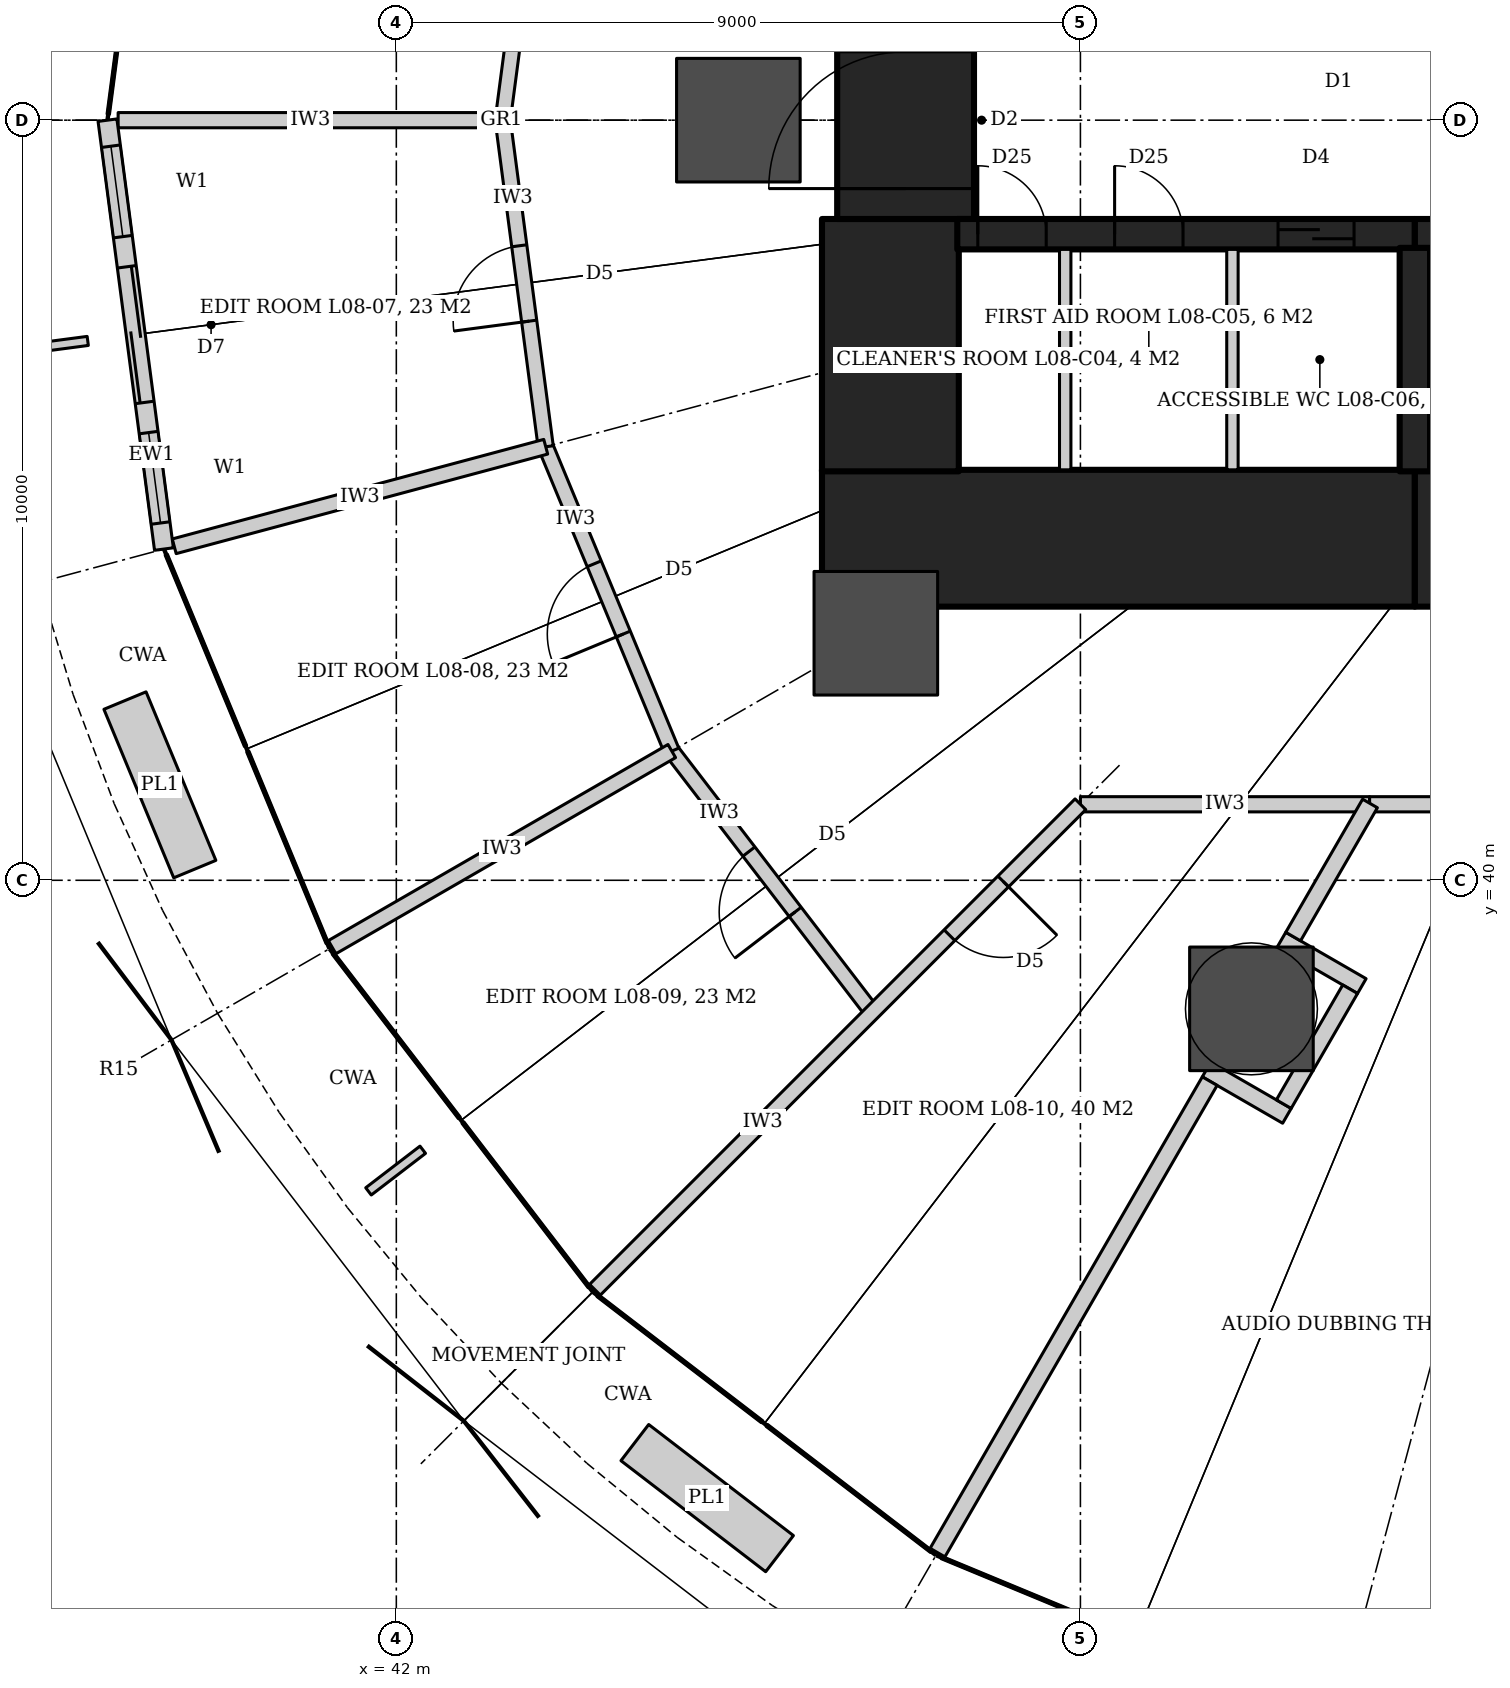
"""IFC4 building model, lengths in metres.
Left out: names, types, materials, properties, quantities, classifications, styles, units other than length and angle.
Written with IfcOpenShell. Run it as: python <this file> out.ifc"""

import sys

from ifc_helpers import new_model, si_unit, direction, frame, frame_2d, origin, origin_2d, place, context, subcontext, project, spatial, rectangle, hollow_circle, extrude, element, fill, save


model = new_model("IFC4")
c1 = context("Model", 3, precision=1e-05, world=origin(), true_north=direction((0.0, 1.0)))
c2 = subcontext(c1, "Body", "Model", "MODEL_VIEW")
j1 = project(units=[si_unit("LENGTHUNIT", "METRE"), si_unit("PLANEANGLEUNIT", "RADIAN")], contexts=[c1])
p1 = place(None, origin())
s1 = spatial("IfcSite", under=j1, at=p1, CompositionType="ELEMENT")
p2 = place(p1, origin())
s2 = spatial("IfcBuilding", under=s1, at=p2, CompositionType="ELEMENT")
p3 = place(p2, frame((0.0, 0.0, 42.8)))
s3 = spatial("IfcBuildingStorey", under=s2, at=p3, CompositionType="ELEMENT", Elevation=42.8)
p4 = place(p3, frame((47.6, 44.5, 0.0), z_axis=(0.0, 0.0, 1.0), x_axis=(1.0, 0.0, 0.0)))
e1 = element("IfcWall", 1, at=p4, inside=s3, PredefinedType="SHEAR", context=c2, shape_type="SweptSolid", body=[
    extrude(rectangle(XDim=7.8, YDim=1.8, at=frame_2d((3.9, 0.0))), origin(), (0.0, 0.0, 1.0), 4.2),
])
p5 = place(p3, frame((55.4, 44.5, 0.0), z_axis=(0.0, 0.0, 1.0), x_axis=(1.0, 0.0, 0.0)))
e2 = element("IfcWall", 2, at=p5, inside=s3, PredefinedType="SHEAR", context=c2, shape_type="SweptSolid", body=[
    extrude(rectangle(XDim=9.2, YDim=1.8, at=frame_2d((4.6, 0.0))), origin(), (0.0, 0.0, 1.0), 4.2),
])
p6 = place(p3, frame((48.5, 45.38, 0.0), z_axis=(0.0, 0.0, 1.0), x_axis=(0.0, 1.0, 0.0)))
e3 = element("IfcWall", 3, at=p6, inside=s3, PredefinedType="SHEAR", context=c2, shape_type="SweptSolid", body=[
    extrude(rectangle(XDim=3.32, YDim=1.8, at=frame_2d((1.66, 0.0))), origin(), (0.0, 0.0, 1.0), 4.2),
])
p7 = place(p3, frame((48.7, 48.7, 0.0), z_axis=(0.0, 0.0, 1.0), x_axis=(0.0, 1.0, 0.0)))
e4 = element("IfcWall", 4, at=p7, inside=s3, PredefinedType="SHEAR", context=c2, shape_type="SweptSolid", body=[
    extrude(rectangle(XDim=2.6, YDim=1.8, at=frame_2d((1.3, 0.0))), origin(), (0.0, 0.0, 1.0), 4.2),
])
p8 = place(p7, frame((0.4, 0.0, 0.0)))
e5 = element("IfcOpeningElement", 5, at=p8, cuts=e4, PredefinedType="OPENING", context=c2, shape_type="SweptSolid", body=[
    extrude(rectangle(XDim=1.8, YDim=2.1, at=frame_2d((0.9, 1.05))), frame((0.0, 0.91, 0.0), z_axis=(0.0, -1.0, 0.0), x_axis=(1.0, 0.0, 0.0)), (0.0, 0.0, 1.0), 1.82),
])
p9 = place(p3, frame((49.38, 48.5, 0.0), z_axis=(0.0, 0.0, 1.0), x_axis=(1.0, 0.0, 0.0)))
e6 = element("IfcWall", 6, at=p9, inside=s3, PredefinedType="SHEAR", context=c2, shape_type="SweptSolid", body=[
    extrude(rectangle(XDim=6.02, YDim=0.4, at=frame_2d((3.01, 0.0))), origin(), (0.0, 0.0, 1.0), 4.2),
])
p10 = place(p9, frame((0.27, 0.0, 0.0)))
e7 = element("IfcOpeningElement", 7, at=p10, cuts=e6, PredefinedType="OPENING", context=c2, shape_type="SweptSolid", body=[
    extrude(rectangle(XDim=0.9, YDim=2.1, at=frame_2d((0.45, 1.05))), frame((0.0, 0.21, 0.0), z_axis=(0.0, -1.0, 0.0), x_axis=(1.0, 0.0, 0.0)), (0.0, 0.0, 1.0), 0.42),
])
p11 = place(p9, frame((2.07, 0.0, 0.0)))
e8 = element("IfcOpeningElement", 8, at=p11, cuts=e6, PredefinedType="OPENING", context=c2, shape_type="SweptSolid", body=[
    extrude(rectangle(XDim=0.9, YDim=2.1, at=frame_2d((0.45, 1.05))), frame((0.0, 0.21, 0.0), z_axis=(0.0, -1.0, 0.0), x_axis=(1.0, 0.0, 0.0)), (0.0, 0.0, 1.0), 0.42),
])
p12 = place(p9, frame((4.22, 0.0, 0.0)))
e9 = element("IfcOpeningElement", 9, at=p12, cuts=e6, PredefinedType="OPENING", context=c2, shape_type="SweptSolid", body=[
    extrude(rectangle(XDim=1.0, YDim=2.1, at=frame_2d((0.5, 1.05))), frame((0.0, 0.21, 0.0), z_axis=(0.0, -1.0, 0.0), x_axis=(1.0, 0.0, 0.0)), (0.0, 0.0, 1.0), 0.42),
])
p13 = place(p3, frame((55.4, 48.5, 0.0), z_axis=(0.0, 0.0, 1.0), x_axis=(1.0, 0.0, 0.0)))
e10 = element("IfcWall", 10, at=p13, inside=s3, PredefinedType="SHEAR", context=c2, shape_type="SweptSolid", body=[
    extrude(rectangle(XDim=9.2, YDim=0.4, at=frame_2d((4.6, 0.0))), origin(), (0.0, 0.0, 1.0), 4.2),
])
p14 = place(p3, frame((55.4, 48.32, 0.0), z_axis=(0.0, 0.0, 1.0), x_axis=(0.0, -1.0, 0.0)))
e11 = element("IfcWall", 11, at=p14, inside=s3, PredefinedType="SHEAR", context=c2, shape_type="SweptSolid", body=[
    extrude(rectangle(XDim=2.94, YDim=0.4, at=frame_2d((1.47, 0.0))), origin(), (0.0, 0.0, 1.0), 4.2),
])
for number, where, z_axis, x_axis in (
    (12, (46.5, 50.0, 0.0), (0.0, 0.0, 1.0), (1.0, 0.0, 0.0)),
    (13, (48.309, 43.25, 0.0), (0.0, 0.0, 1.0), (1.0, 0.0, 0.0)),
    (14, (53.25, 38.309, 0.0), (0.0, 0.0, 1.0), (1.0, 0.0, 0.0)),
):
    element("IfcColumn", number, at=place(p3, frame(where, z_axis=z_axis, x_axis=x_axis)), inside=s3, PredefinedType="COLUMN", context=c2, shape_type="SweptSolid", body=[
        extrude(hollow_circle(Radius=0.813, WallThickness=0.08, at=origin_2d()), origin(), (0.0, 0.0, 1.0), 4.2),
    ])
p15 = place(p3, frame((48.262, 38.262, 0.0), z_axis=(0.0, 0.0, 1.0), x_axis=(-0.60874374674, 0.79336690806, 0.0)))
e15 = element("IfcWall", 15, at=p15, inside=s3, PredefinedType="PARTITIONING", context=c2, shape_type="SweptSolid", body=[
    extrude(rectangle(XDim=4.333, YDim=0.2, at=frame_2d((2.167, 0.0))), origin(), (0.0, 0.0, 1.0), 3.04),
])
p16 = place(p15, frame((1.667, 0.0, 0.0)))
e16 = element("IfcOpeningElement", 16, at=p16, cuts=e15, PredefinedType="OPENING", context=c2, shape_type="SweptSolid", body=[
    extrude(rectangle(XDim=1.0, YDim=2.1, at=frame_2d((0.5, 1.05))), frame((0.0, 0.11, 0.0), z_axis=(0.0, -1.0, 0.0), x_axis=(1.0, 0.0, 0.0)), (0.0, 0.0, 1.0), 0.22),
])
p17 = place(p3, frame((45.624, 41.7, 0.0), z_axis=(0.0, 0.0, 1.0), x_axis=(-0.382698425325, 0.923873322082, 0.0)))
e17 = element("IfcWall", 17, at=p17, inside=s3, PredefinedType="PARTITIONING", context=c2, shape_type="SweptSolid", body=[
    extrude(rectangle(XDim=4.333, YDim=0.2, at=frame_2d((2.167, 0.0))), origin(), (0.0, 0.0, 1.0), 3.04),
])
p18 = place(p17, frame((1.667, 0.0, 0.0)))
e18 = element("IfcOpeningElement", 18, at=p18, cuts=e17, PredefinedType="OPENING", context=c2, shape_type="SweptSolid", body=[
    extrude(rectangle(XDim=1.0, YDim=2.1, at=frame_2d((0.5, 1.05))), frame((0.0, 0.11, 0.0), z_axis=(0.0, -1.0, 0.0), x_axis=(1.0, 0.0, 0.0)), (0.0, 0.0, 1.0), 0.22),
])
p19 = place(p3, frame((43.966, 45.704, 0.0), z_axis=(0.0, 0.0, 1.0), x_axis=(-0.130536124221, 0.99144355375, 0.0)))
e19 = element("IfcWall", 19, at=p19, inside=s3, PredefinedType="PARTITIONING", context=c2, shape_type="SweptSolid", body=[
    extrude(rectangle(XDim=4.333, YDim=0.2, at=frame_2d((2.167, 0.0))), origin(), (0.0, 0.0, 1.0), 3.04),
])
p20 = place(p19, frame((1.667, 0.0, 0.0)))
e20 = element("IfcOpeningElement", 20, at=p20, cuts=e19, PredefinedType="OPENING", context=c2, shape_type="SweptSolid", body=[
    extrude(rectangle(XDim=1.0, YDim=2.1, at=frame_2d((0.5, 1.05))), frame((0.0, 0.11, 0.0), z_axis=(0.0, -1.0, 0.0), x_axis=(1.0, 0.0, 0.0)), (0.0, 0.0, 1.0), 0.22),
])
p21 = place(p3, frame((43.4, 50.0, 0.0), z_axis=(0.0, 0.0, 1.0), x_axis=(0.130536124221, 0.99144355375, 0.0)))
e21 = element("IfcWall", 21, at=p21, inside=s3, PredefinedType="PARTITIONING", context=c2, shape_type="SweptSolid", body=[
    extrude(rectangle(XDim=4.333, YDim=0.2, at=frame_2d((2.167, 0.0))), origin(), (0.0, 0.0, 1.0), 3.04),
])
p22 = place(p21, frame((1.667, 0.0, 0.0)))
e22 = element("IfcOpeningElement", 22, at=p22, cuts=e21, PredefinedType="OPENING", context=c2, shape_type="SweptSolid", body=[
    extrude(rectangle(XDim=1.0, YDim=2.1, at=frame_2d((0.5, 1.05))), frame((0.0, 0.11, 0.0), z_axis=(0.0, -1.0, 0.0), x_axis=(1.0, 0.0, 0.0)), (0.0, 0.0, 1.0), 0.22),
])
p23 = place(p3, frame((60.0, 41.0, 0.0), z_axis=(0.0, 0.0, 1.0), x_axis=(-1.0, 0.0, 0.0)))
e23 = element("IfcWall", 23, at=p23, inside=s3, PredefinedType="PARTITIONING", context=c2, shape_type="SweptSolid", body=[
    extrude(rectangle(XDim=5.196, YDim=0.2, at=frame_2d((2.598, 0.0))), origin(), (0.0, 0.0, 1.0), 3.04),
])
p24 = place(p23, frame((1.698, 0.0, 0.0)))
e24 = element("IfcOpeningElement", 24, at=p24, cuts=e23, PredefinedType="OPENING", context=c2, shape_type="SweptSolid", body=[
    extrude(rectangle(XDim=1.8, YDim=2.7, at=frame_2d((0.9, 1.35))), frame((0.0, 0.11, 0.0), z_axis=(0.0, -1.0, 0.0), x_axis=(1.0, 0.0, 0.0)), (0.0, 0.0, 1.0), 0.22),
])
p25 = place(p3, frame((54.804, 41.0, 0.0), z_axis=(0.0, 0.0, 1.0), x_axis=(-1.0, 0.0, 0.0)))
e25 = element("IfcWall", 25, at=p25, inside=s3, PredefinedType="PARTITIONING", context=c2, shape_type="SweptSolid", body=[
    extrude(rectangle(XDim=3.804, YDim=0.2, at=frame_2d((1.902, 0.0))), origin(), (0.0, 0.0, 1.0), 3.02),
])
p26 = place(p3, frame((43.4, 50.0, 0.0), z_axis=(0.0, 0.0, 1.0), x_axis=(-1.0, 0.0, 0.0)))
e26 = element("IfcWall", 26, at=p26, inside=s3, PredefinedType="PARTITIONING", context=c2, shape_type="SweptSolid", body=[
    extrude(rectangle(XDim=5.06, YDim=0.2, at=frame_2d((2.53, 0.0))), origin(), (0.0, 0.0, 1.0), 3.04),
])
p27 = place(p3, frame((43.966, 45.704, 0.0), z_axis=(0.0, 0.0, 1.0), x_axis=(-0.965929961432, -0.258803612044, 0.0)))
e27 = element("IfcWall", 27, at=p27, inside=s3, PredefinedType="PARTITIONING", context=c2, shape_type="SweptSolid", body=[
    extrude(rectangle(XDim=5.06, YDim=0.2, at=frame_2d((2.53, 0.0))), origin(), (0.0, 0.0, 1.0), 3.04),
])
p28 = place(p3, frame((45.624, 41.7, 0.0), z_axis=(0.0, 0.0, 1.0), x_axis=(-0.866042189445, -0.499970925255, 0.0)))
e28 = element("IfcWall", 28, at=p28, inside=s3, PredefinedType="PARTITIONING", context=c2, shape_type="SweptSolid", body=[
    extrude(rectangle(XDim=5.16, YDim=0.2, at=frame_2d((2.58, 0.0))), origin(), (0.0, 0.0, 1.0), 3.04),
])
p29 = place(p3, frame((51.0, 41.0, 0.0), z_axis=(0.0, 0.0, 1.0), x_axis=(-0.707106781187, -0.707106781187, 0.0)))
e29 = element("IfcWall", 29, at=p29, inside=s3, PredefinedType="PARTITIONING", context=c2, shape_type="SweptSolid", body=[
    extrude(rectangle(XDim=9.032, YDim=0.2, at=frame_2d((4.516, 0.0))), origin(), (0.0, 0.0, 1.0), 3.02),
])
p30 = place(p29, frame((1.436, 0.0, 0.0)))
e30 = element("IfcOpeningElement", 30, at=p30, cuts=e29, PredefinedType="OPENING", context=c2, shape_type="SweptSolid", body=[
    extrude(rectangle(XDim=1.0, YDim=2.1, at=frame_2d((0.5, 1.05))), frame((0.0, 0.11, 0.0), z_axis=(0.0, -1.0, 0.0), x_axis=(1.0, 0.0, 0.0)), (0.0, 0.0, 1.0), 0.22),
])
p31 = place(p3, frame((53.645, 39.219, 0.0), z_axis=(0.0, 0.0, 1.0), x_axis=(0.866019052629, -0.500011000363, 0.0)))
e31 = element("IfcWall", 31, at=p31, inside=s3, PredefinedType="PARTITIONING", context=c2, shape_type="SweptSolid", body=[
    extrude(rectangle(XDim=1.221, YDim=0.225, at=frame_2d((0.61, 0.0))), origin(), (0.0, 0.0, 1.0), 3.02),
])
p32 = place(p3, frame((52.66, 37.511, 0.0), z_axis=(0.0, 0.0, 1.0), x_axis=(0.865969036334, -0.500097618581, 0.0)))
e32 = element("IfcWall", 32, at=p32, inside=s3, PredefinedType="PARTITIONING", context=c2, shape_type="SweptSolid", body=[
    extrude(rectangle(XDim=1.22, YDim=0.225, at=frame_2d((0.61, 0.0))), origin(), (0.0, 0.0, 1.0), 3.02),
])
p33 = place(p3, frame((54.549, 38.567, 0.0), z_axis=(0.0, 0.0, 1.0), x_axis=(-0.500049268192, -0.865996956912, 0.0)))
e33 = element("IfcWall", 33, at=p33, inside=s3, PredefinedType="PARTITIONING", context=c2, shape_type="SweptSolid", body=[
    extrude(rectangle(XDim=1.746, YDim=0.225, at=frame_2d((0.873, 0.0))), origin(), (0.0, 0.0, 1.0), 3.02),
])
p34 = place(p3, frame((54.81, 41.011, 0.0), z_axis=(0.0, 0.0, 1.0), x_axis=(-0.499969802211, -0.866042837784, 0.0)))
e34 = element("IfcWall", 34, at=p34, inside=s3, PredefinedType="PARTITIONING", context=c2, shape_type="SweptSolid", body=[
    extrude(rectangle(XDim=2.022, YDim=0.225, at=frame_2d((1.011, 0.0))), origin(), (0.0, 0.0, 1.0), 3.04),
])
p35 = place(p3, frame((52.701, 37.358, 0.0), z_axis=(0.0, 0.0, 1.0), x_axis=(-0.499970319043, -0.866042539415, 0.0)))
e35 = element("IfcWall", 35, at=p35, inside=s3, PredefinedType="PARTITIONING", context=c2, shape_type="SweptSolid", body=[
    extrude(rectangle(XDim=7.162, YDim=0.225, at=frame_2d((3.581, 0.0))), origin(), (0.0, 0.0, 1.0), 3.04),
])
p36 = place(p3, frame((38.2, 50.0, 0.0), z_axis=(0.0, 0.0, 1.0), x_axis=(0.130542179395, -0.991442756491, 0.0)))
e36 = element("IfcWall", 36, at=p36, inside=s3, PredefinedType="SOLIDWALL", context=c2, shape_type="SweptSolid", body=[
    extrude(rectangle(XDim=5.691, YDim=0.25, at=frame_2d((2.845, 0.0))), origin(), (0.0, 0.0, 1.0), 4.04),
])
p37 = place(p36, frame((1.946, 0.0, 0.0)))
e37 = element("IfcOpeningElement", 37, at=p37, cuts=e36, PredefinedType="OPENING", context=c2, shape_type="SweptSolid", body=[
    extrude(rectangle(XDim=1.8, YDim=2.4, at=frame_2d((0.9, 1.2))), frame((0.0, 0.135, 0.0), z_axis=(0.0, -1.0, 0.0), x_axis=(1.0, 0.0, 0.0)), (0.0, 0.0, 1.0), 0.27),
])
p38 = place(p36, frame((0.345, 0.0, 0.0)))
e38 = element("IfcOpeningElement", 38, at=p38, cuts=e36, PredefinedType="OPENING", context=c2, shape_type="SweptSolid", body=[
    extrude(rectangle(XDim=1.2, YDim=2.4, at=frame_2d((0.6, 1.2))), frame((0.0, 0.135, 0.0), z_axis=(0.0, -1.0, 0.0), x_axis=(1.0, 0.0, 0.0)), (0.0, 0.0, 1.0), 0.27),
])
p39 = place(p36, frame((4.146, 0.0, 0.0)))
e39 = element("IfcOpeningElement", 39, at=p39, cuts=e36, PredefinedType="OPENING", context=c2, shape_type="SweptSolid", body=[
    extrude(rectangle(XDim=1.2, YDim=2.4, at=frame_2d((0.6, 1.2))), frame((0.0, 0.135, 0.0), z_axis=(0.0, -1.0, 0.0), x_axis=(1.0, 0.0, 0.0)), (0.0, 0.0, 1.0), 0.27),
])
for number, where, z_axis, x_axis in (
    (40, (50.8, 45.4, 0.0), (0.0, 0.0, 1.0), (0.0, 1.0, 0.0)),
    (41, (53.0, 45.4, 0.0), (0.0, 0.0, 1.0), (0.0, 1.0, 0.0)),
):
    element("IfcWall", number, at=place(p3, frame(where, z_axis=z_axis, x_axis=x_axis)), inside=s3, PredefinedType="PARTITIONING", context=c2, shape_type="SweptSolid", body=[
        extrude(rectangle(XDim=2.9, YDim=0.15, at=frame_2d((1.45, 0.0))), origin(), (0.0, 0.0, 1.0), 4.04),
    ])
p40 = place(p20, origin())
e42 = element("IfcDoor", 42, at=p40, inside=s3, OperationType="SINGLE_SWING_LEFT", PredefinedType="DOOR", context=c2, shape_type="SweptSolid", body=[
    extrude(rectangle(XDim=1.0, YDim=2.1, at=frame_2d((0.5, 1.05))), frame((0.0, 0.025, 0.0), z_axis=(0.0, -1.0, 0.0), x_axis=(1.0, 0.0, 0.0)), (0.0, 0.0, 1.0), 0.05),
])
fill(e20, e42)
p41 = place(p18, origin())
e43 = element("IfcDoor", 43, at=p41, inside=s3, OperationType="SINGLE_SWING_LEFT", PredefinedType="DOOR", context=c2, shape_type="SweptSolid", body=[
    extrude(rectangle(XDim=1.0, YDim=2.1, at=frame_2d((0.5, 1.05))), frame((0.0, 0.025, 0.0), z_axis=(0.0, -1.0, 0.0), x_axis=(1.0, 0.0, 0.0)), (0.0, 0.0, 1.0), 0.05),
])
fill(e18, e43)
p42 = place(p16, origin())
e44 = element("IfcDoor", 44, at=p42, inside=s3, OperationType="SINGLE_SWING_LEFT", PredefinedType="DOOR", context=c2, shape_type="SweptSolid", body=[
    extrude(rectangle(XDim=1.0, YDim=2.1, at=frame_2d((0.5, 1.05))), frame((0.0, 0.025, 0.0), z_axis=(0.0, -1.0, 0.0), x_axis=(1.0, 0.0, 0.0)), (0.0, 0.0, 1.0), 0.05),
])
fill(e16, e44)
p43 = place(p30, origin())
e45 = element("IfcDoor", 45, at=p43, inside=s3, OperationType="SINGLE_SWING_LEFT", PredefinedType="DOOR", context=c2, shape_type="SweptSolid", body=[
    extrude(rectangle(XDim=1.0, YDim=2.1, at=frame_2d((0.5, 1.05))), frame((0.0, 0.025, 0.0), z_axis=(0.0, -1.0, 0.0), x_axis=(1.0, 0.0, 0.0)), (0.0, 0.0, 1.0), 0.05),
])
fill(e30, e45)
p44 = place(p37, origin())
e46 = element("IfcDoor", 46, at=p44, inside=s3, OperationType="DOUBLE_DOOR_SLIDING", PredefinedType="DOOR", context=c2, shape_type="SweptSolid", body=[
    extrude(rectangle(XDim=1.8, YDim=2.4, at=frame_2d((0.9, 1.2))), frame((0.0, 0.025, 0.0), z_axis=(0.0, -1.0, 0.0), x_axis=(1.0, 0.0, 0.0)), (0.0, 0.0, 1.0), 0.05),
])
fill(e37, e46)
p45 = place(p38, origin())
e47 = element("IfcWindow", 47, at=p45, inside=s3, PartitioningType="SINGLE_PANEL", PredefinedType="WINDOW", context=c2, shape_type="SweptSolid", body=[
    extrude(rectangle(XDim=1.2, YDim=2.4, at=frame_2d((0.6, 1.2))), frame((0.0, 0.03, 0.0), z_axis=(0.0, -1.0, 0.0), x_axis=(1.0, 0.0, 0.0)), (0.0, 0.0, 1.0), 0.06),
])
fill(e38, e47)
p46 = place(p39, origin())
e48 = element("IfcWindow", 48, at=p46, inside=s3, PartitioningType="SINGLE_PANEL", PredefinedType="WINDOW", context=c2, shape_type="SweptSolid", body=[
    extrude(rectangle(XDim=1.2, YDim=2.4, at=frame_2d((0.6, 1.2))), frame((0.0, 0.03, 0.0), z_axis=(0.0, -1.0, 0.0), x_axis=(1.0, 0.0, 0.0)), (0.0, 0.0, 1.0), 0.06),
])
fill(e39, e48)
p47 = place(p10, origin())
e49 = element("IfcDoor", 49, at=p47, inside=s3, OperationType="SINGLE_SWING_RIGHT", PredefinedType="DOOR", context=c2, shape_type="SweptSolid", body=[
    extrude(rectangle(XDim=0.9, YDim=2.1, at=frame_2d((0.45, 1.05))), frame((0.0, 0.025, 0.0), z_axis=(0.0, -1.0, 0.0), x_axis=(1.0, 0.0, 0.0)), (0.0, 0.0, 1.0), 0.05),
])
fill(e7, e49)
p48 = place(p11, origin())
e50 = element("IfcDoor", 50, at=p48, inside=s3, OperationType="SINGLE_SWING_RIGHT", PredefinedType="DOOR", context=c2, shape_type="SweptSolid", body=[
    extrude(rectangle(XDim=0.9, YDim=2.1, at=frame_2d((0.45, 1.05))), frame((0.0, 0.025, 0.0), z_axis=(0.0, -1.0, 0.0), x_axis=(1.0, 0.0, 0.0)), (0.0, 0.0, 1.0), 0.05),
])
fill(e8, e50)
p49 = place(p12, origin())
e51 = element("IfcDoor", 51, at=p49, inside=s3, OperationType="SLIDING_TO_LEFT", PredefinedType="DOOR", context=c2, shape_type="SweptSolid", body=[
    extrude(rectangle(XDim=1.0, YDim=2.1, at=frame_2d((0.5, 1.05))), frame((0.0, 0.025, 0.0), z_axis=(0.0, -1.0, 0.0), x_axis=(1.0, 0.0, 0.0)), (0.0, 0.0, 1.0), 0.05),
])
fill(e9, e51)
p50 = place(p8, origin())
e52 = element("IfcDoor", 52, at=p50, inside=s3, OperationType="DOUBLE_DOOR_DOUBLE_SWING", PredefinedType="DOOR", context=c2, shape_type="SweptSolid", body=[
    extrude(rectangle(XDim=1.8, YDim=2.1, at=frame_2d((0.9, 1.05))), frame((0.0, 0.025, 0.0), z_axis=(0.0, -1.0, 0.0), x_axis=(1.0, 0.0, 0.0)), (0.0, 0.0, 1.0), 0.05),
])
fill(e5, e52)
save(model, sys.argv[1])
